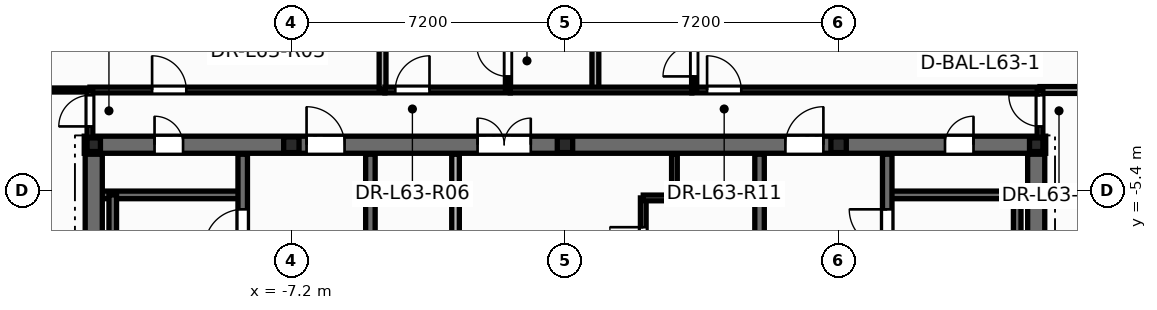
"""IFC4 building model, lengths in metres.
Left out: names, types, materials, properties, quantities, classifications, styles, units other than length and angle.
Written with IfcOpenShell. Run it as: python <this file> out.ifc"""

import sys

from ifc_helpers import new_model, si_unit, direction, frame, frame_2d, origin, origin_2d, place, context, subcontext, project, spatial, rectangle, i_section, extrude, element, fill, save


model = new_model("IFC4")
c1 = context("Model", 3, precision=1e-05, world=origin(), true_north=direction((0.0, 1.0)))
c2 = subcontext(c1, "Body", "Model", "MODEL_VIEW")
j1 = project(units=[si_unit("LENGTHUNIT", "METRE"), si_unit("PLANEANGLEUNIT", "RADIAN")], contexts=[c1])
p1 = place(None, origin())
s1 = spatial("IfcSite", under=j1, at=p1, CompositionType="ELEMENT")
p2 = place(p1, origin())
s2 = spatial("IfcBuilding", under=s1, at=p2, CompositionType="ELEMENT")
p3 = place(p2, frame((0.0, 0.0, 240.6)))
s3 = spatial("IfcBuildingStorey", under=s2, at=p3, CompositionType="ELEMENT", Elevation=240.6)
for number, where, z_axis, x_axis in (
    (1, (12.4, -4.2, 0.0), (0.0, 0.0, 1.0), (1.0, 0.0, 0.0)),
    (2, (-12.4, -4.2, 0.0), (0.0, 0.0, 1.0), (1.0, 0.0, 0.0)),
):
    element("IfcColumn", number, at=place(p3, frame(where, z_axis=z_axis, x_axis=x_axis)), inside=s3, PredefinedType="COLUMN", context=c2, shape_type="SweptSolid", body=[
        extrude(i_section(OverallWidth=0.352, OverallDepth=0.359, WebThickness=0.018, FlangeThickness=0.026, at=origin_2d()), origin(), (0.0, 0.0, 1.0), 3.6),
    ])
for number, where, z_axis, x_axis in (
    (3, (-7.2, -4.2, 0.0), (0.0, 0.0, 1.0), (1.0, 0.0, 0.0)),
    (4, (0.0, -4.2, 0.0), (0.0, 0.0, 1.0), (1.0, 0.0, 0.0)),
    (5, (7.2, -4.2, 0.0), (0.0, 0.0, 1.0), (1.0, 0.0, 0.0)),
):
    element("IfcColumn", number, at=place(p3, frame(where, z_axis=z_axis, x_axis=x_axis)), inside=s3, PredefinedType="PILASTER", context=c2, shape_type="SweptSolid", body=[
        extrude(i_section(OverallWidth=0.405, OverallDepth=0.414, WebThickness=0.022, FlangeThickness=0.032, at=origin_2d()), origin(), (0.0, 0.0, 1.0), 3.6),
    ])
p4 = place(p3, frame((2.06, -7.9, 0.0), z_axis=(0.0, 0.0, 1.0), x_axis=(0.0, 1.0, 0.0)))
e6 = element("IfcWall", 6, at=p4, inside=s3, PredefinedType="PARTITIONING", context=c2, shape_type="SweptSolid", body=[
    extrude(rectangle(XDim=2.3, YDim=0.15, at=frame_2d((1.15, 0.0))), origin(), (0.0, 0.0, 1.0), 3.28),
])
p5 = place(p4, frame((0.65, 0.0, 0.0)))
e7 = element("IfcOpeningElement", 7, at=p5, cuts=e6, PredefinedType="OPENING", context=c2, shape_type="SweptSolid", body=[
    extrude(rectangle(XDim=0.886, YDim=2.104, at=frame_2d((0.44, 1.052))), frame((0.0, 0.085, 0.0), z_axis=(0.0, -1.0, 0.0), x_axis=(1.0, 0.0, 0.0)), (0.0, 0.0, 1.0), 0.17),
])
p6 = place(p3, frame((2.06, -5.6, 0.0), z_axis=(0.0, 0.0, 1.0), x_axis=(1.0, 0.0, 0.0)))
e8 = element("IfcWall", 8, at=p6, inside=s3, PredefinedType="PARTITIONING", context=c2, shape_type="SweptSolid", body=[
    extrude(rectangle(XDim=0.82, YDim=0.15, at=frame_2d((0.41, 0.0))), origin(), (0.0, 0.0, 1.0), 3.28),
])
p7 = place(p3, frame((2.88, -5.6, 0.0), z_axis=(0.0, 0.0, 1.0), x_axis=(0.0, 1.0, 0.0)))
e9 = element("IfcWall", 9, at=p7, inside=s3, PredefinedType="PARTITIONING", context=c2, shape_type="SweptSolid", body=[
    extrude(rectangle(XDim=1.15, YDim=0.15, at=frame_2d((0.575, 0.0))), origin(), (0.0, 0.0, 1.0), 3.28),
])
p8 = place(p3, frame((-12.65, -4.2, 0.0), z_axis=(0.0, 0.0, 1.0), x_axis=(1.0, 0.0, 0.0)))
e10 = element("IfcWall", 10, at=p8, inside=s3, PredefinedType="SHEAR", context=c2, shape_type="SweptSolid", body=[
    extrude(rectangle(XDim=25.3, YDim=0.45, at=frame_2d((12.65, 0.0))), origin(), (0.0, 0.0, 1.0), 3.6),
])
p9 = place(p8, frame((1.85, 0.0, 0.0)))
e11 = element("IfcOpeningElement", 11, at=p9, cuts=e10, PredefinedType="OPENING", context=c2, shape_type="SweptSolid", body=[
    extrude(rectangle(XDim=0.756, YDim=2.054, at=frame_2d((0.375, 1.027))), frame((0.0, 0.235, 0.0), z_axis=(0.0, -1.0, 0.0), x_axis=(1.0, 0.0, 0.0)), (0.0, 0.0, 1.0), 0.47),
])
p10 = place(p8, frame((22.65, 0.0, 0.0)))
e12 = element("IfcOpeningElement", 12, at=p10, cuts=e10, PredefinedType="OPENING", context=c2, shape_type="SweptSolid", body=[
    extrude(rectangle(XDim=0.756, YDim=2.054, at=frame_2d((0.375, 1.027))), frame((0.0, 0.235, 0.0), z_axis=(0.0, -1.0, 0.0), x_axis=(1.0, 0.0, 0.0)), (0.0, 0.0, 1.0), 0.47),
])
p11 = place(p8, frame((5.85, 0.0, 0.0)))
e13 = element("IfcOpeningElement", 13, at=p11, cuts=e10, PredefinedType="OPENING", context=c2, shape_type="SweptSolid", body=[
    extrude(rectangle(XDim=1.006, YDim=2.104, at=frame_2d((0.5, 1.052))), frame((0.0, 0.235, 0.0), z_axis=(0.0, -1.0, 0.0), x_axis=(1.0, 0.0, 0.0)), (0.0, 0.0, 1.0), 0.47),
])
p12 = place(p8, frame((10.35, 0.0, 0.0)))
e14 = element("IfcOpeningElement", 14, at=p12, cuts=e10, PredefinedType="OPENING", context=c2, shape_type="SweptSolid", body=[
    extrude(rectangle(XDim=1.406, YDim=2.154, at=frame_2d((0.7, 1.077))), frame((0.0, 0.235, 0.0), z_axis=(0.0, -1.0, 0.0), x_axis=(1.0, 0.0, 0.0)), (0.0, 0.0, 1.0), 0.47),
])
p13 = place(p8, frame((18.45, 0.0, 0.0)))
e15 = element("IfcOpeningElement", 15, at=p13, cuts=e10, PredefinedType="OPENING", context=c2, shape_type="SweptSolid", body=[
    extrude(rectangle(XDim=1.006, YDim=2.104, at=frame_2d((0.5, 1.052))), frame((0.0, 0.235, 0.0), z_axis=(0.0, -1.0, 0.0), x_axis=(1.0, 0.0, 0.0)), (0.0, 0.0, 1.0), 0.47),
])
p14 = place(p3, frame((-12.35, -5.52, 0.0), z_axis=(0.0, 0.0, 1.0), x_axis=(1.0, 0.0, 0.0)))
e16 = element("IfcWall", 16, at=p14, inside=s3, PredefinedType="SOLIDWALL", context=c2, shape_type="SweptSolid", body=[
    extrude(rectangle(XDim=3.87, YDim=0.2, at=frame_2d((1.935, 0.0))), origin(), (0.0, 0.0, 1.0), 3.6),
])
p15 = place(p3, frame((-11.9, -13.1, 0.0), z_axis=(0.0, 0.0, 1.0), x_axis=(0.0, 1.0, 0.0)))
e17 = element("IfcWall", 17, at=p15, inside=s3, PredefinedType="SOLIDWALL", context=c2, shape_type="SweptSolid", body=[
    extrude(rectangle(XDim=7.58, YDim=0.2, at=frame_2d((3.79, 0.0))), origin(), (0.0, 0.0, 1.0), 3.6),
])
p16 = place(p3, frame((8.48, -5.52, 0.0), z_axis=(0.0, 0.0, 1.0), x_axis=(1.0, 0.0, 0.0)))
e18 = element("IfcWall", 18, at=p16, inside=s3, PredefinedType="SOLIDWALL", context=c2, shape_type="SweptSolid", body=[
    extrude(rectangle(XDim=3.87, YDim=0.2, at=frame_2d((1.935, 0.0))), origin(), (0.0, 0.0, 1.0), 3.6),
])
p17 = place(p3, frame((11.9, -13.1, 0.0), z_axis=(0.0, 0.0, 1.0), x_axis=(0.0, 1.0, 0.0)))
e19 = element("IfcWall", 19, at=p17, inside=s3, PredefinedType="SOLIDWALL", context=c2, shape_type="SweptSolid", body=[
    extrude(rectangle(XDim=7.58, YDim=0.2, at=frame_2d((3.79, 0.0))), origin(), (0.0, 0.0, 1.0), 3.6),
])
p18 = place(p3, frame((-8.48, -13.85, 0.0), z_axis=(0.0, 0.0, 1.0), x_axis=(0.0, 1.0, 0.0)))
e20 = element("IfcWall", 20, at=p18, inside=s3, PredefinedType="SHEAR", context=c2, shape_type="SweptSolid", body=[
    extrude(rectangle(XDim=9.4, YDim=0.25, at=frame_2d((4.7, 0.0))), origin(), (0.0, 0.0, 1.0), 3.6),
])
p19 = place(p18, frame((6.95, 0.0, 0.0)))
e21 = element("IfcOpeningElement", 21, at=p19, cuts=e20, PredefinedType="OPENING", context=c2, shape_type="SweptSolid", body=[
    extrude(rectangle(XDim=1.006, YDim=2.104, at=frame_2d((0.5, 1.052))), frame((0.0, 0.135, 0.0), z_axis=(0.0, -1.0, 0.0), x_axis=(1.0, 0.0, 0.0)), (0.0, 0.0, 1.0), 0.27),
])
p20 = place(p3, frame((8.48, -13.85, 0.0), z_axis=(0.0, 0.0, 1.0), x_axis=(0.0, 1.0, 0.0)))
e22 = element("IfcWall", 22, at=p20, inside=s3, PredefinedType="SHEAR", context=c2, shape_type="SweptSolid", body=[
    extrude(rectangle(XDim=9.4, YDim=0.25, at=frame_2d((4.7, 0.0))), origin(), (0.0, 0.0, 1.0), 3.6),
])
p21 = place(p20, frame((6.95, 0.0, 0.0)))
e23 = element("IfcOpeningElement", 23, at=p21, cuts=e22, PredefinedType="OPENING", context=c2, shape_type="SweptSolid", body=[
    extrude(rectangle(XDim=1.006, YDim=2.104, at=frame_2d((0.5, 1.052))), frame((0.0, 0.135, 0.0), z_axis=(0.0, -1.0, 0.0), x_axis=(1.0, 0.0, 0.0)), (0.0, 0.0, 1.0), 0.27),
])
for number, where, z_axis, x_axis in (
    (24, (-5.12, -13.85, 0.0), (0.0, 0.0, 1.0), (0.0, 1.0, 0.0)),
    (25, (5.12, -13.85, 0.0), (0.0, 0.0, 1.0), (0.0, 1.0, 0.0)),
):
    element("IfcWall", number, at=place(p3, frame(where, z_axis=z_axis, x_axis=x_axis)), inside=s3, PredefinedType="SHEAR", context=c2, shape_type="SweptSolid", body=[
        extrude(rectangle(XDim=9.4, YDim=0.25, at=frame_2d((4.7, 0.0))), origin(), (0.0, 0.0, 1.0), 3.6),
    ])
for number, where, z_axis, x_axis in (
    (26, (-12.4, -13.85, 0.0), (0.0, 0.0, 1.0), (0.0, 1.0, 0.0)),
    (27, (12.4, -13.85, 0.0), (0.0, 0.0, 1.0), (0.0, 1.0, 0.0)),
):
    element("IfcWall", number, at=place(p3, frame(where, z_axis=z_axis, x_axis=x_axis)), inside=s3, PredefinedType="SHEAR", context=c2, shape_type="SweptSolid", body=[
        extrude(rectangle(XDim=9.4, YDim=0.45, at=frame_2d((4.7, 0.0))), origin(), (0.0, 0.0, 1.0), 3.6),
    ])
p22 = place(p3, frame((-2.88, -9.45, 0.0), z_axis=(0.0, 0.0, 1.0), x_axis=(0.0, 1.0, 0.0)))
e28 = element("IfcWall", 28, at=p22, inside=s3, PredefinedType="SOLIDWALL", context=c2, shape_type="SweptSolid", body=[
    extrude(rectangle(XDim=5.0, YDim=0.2, at=frame_2d((2.5, 0.0))), origin(), (0.0, 0.0, 1.0), 3.28),
])
p23 = place(p22, frame((2.05, 0.0, 0.0)))
e29 = element("IfcOpeningElement", 29, at=p23, cuts=e28, PredefinedType="OPENING", context=c2, shape_type="SweptSolid", body=[
    extrude(rectangle(XDim=0.926, YDim=2.104, at=frame_2d((0.46, 1.052))), frame((0.0, 0.11, 0.0), z_axis=(0.0, -1.0, 0.0), x_axis=(1.0, 0.0, 0.0)), (0.0, 0.0, 1.0), 0.22),
])
p24 = place(p3, frame((3.34, -2.76, 0.0), z_axis=(0.0, 0.0, 1.0), x_axis=(1.0, 0.0, 0.0)))
e30 = element("IfcWall", 30, at=p24, inside=s3, PredefinedType="PARTITIONING", context=c2, shape_type="SweptSolid", body=[
    extrude(rectangle(XDim=9.16, YDim=0.15, at=frame_2d((4.58, 0.0))), origin(), (0.0, 0.0, 1.0), 2.255),
])
p25 = place(p24, frame((0.399, 0.0, 0.0)))
e31 = element("IfcOpeningElement", 31, at=p25, cuts=e30, PredefinedType="OPENING", context=c2, shape_type="SweptSolid", body=[
    extrude(rectangle(XDim=0.906, YDim=2.104, at=frame_2d((0.45, 1.052))), frame((0.0, 0.085, 0.0), z_axis=(0.0, -1.0, 0.0), x_axis=(1.0, 0.0, 0.0)), (0.0, 0.0, 1.0), 0.17),
])
p26 = place(p3, frame((-12.5, -2.76, 0.0), z_axis=(0.0, 0.0, 1.0), x_axis=(1.0, 0.0, 0.0)))
e32 = element("IfcWall", 32, at=p26, inside=s3, PredefinedType="PARTITIONING", context=c2, shape_type="SweptSolid", body=[
    extrude(rectangle(XDim=7.76, YDim=0.15, at=frame_2d((3.88, 0.0))), origin(), (0.0, 0.0, 1.0), 2.255),
])
p27 = place(p26, frame((1.635, 0.0, 0.0)))
e33 = element("IfcOpeningElement", 33, at=p27, cuts=e32, PredefinedType="OPENING", context=c2, shape_type="SweptSolid", body=[
    extrude(rectangle(XDim=0.906, YDim=2.104, at=frame_2d((0.45, 1.052))), frame((0.0, 0.085, 0.0), z_axis=(0.0, -1.0, 0.0), x_axis=(1.0, 0.0, 0.0)), (0.0, 0.0, 1.0), 0.17),
])
p28 = place(p3, frame((-4.8, -2.74, 0.0), z_axis=(0.0, 0.0, 1.0), x_axis=(0.0, 1.0, 0.0)))
e34 = element("IfcWall", 34, at=p28, inside=s3, PredefinedType="PARTITIONING", context=c2, shape_type="SweptSolid", body=[
    extrude(rectangle(XDim=13.633, YDim=0.18, at=frame_2d((6.817, 0.0))), origin(), (0.0, 0.0, 1.0), 2.255),
])
p29 = place(p3, frame((0.8, -2.76, 0.0), z_axis=(0.0, 0.0, 1.0), x_axis=(0.0, 1.0, 0.0)))
e35 = element("IfcWall", 35, at=p29, inside=s3, PredefinedType="PARTITIONING", context=c2, shape_type="SweptSolid", body=[
    extrude(rectangle(XDim=16.509, YDim=0.18, at=frame_2d((8.254, 0.0))), origin(), (0.0, 0.0, 1.0), 2.255),
])
p30 = place(p3, frame((-4.738, -2.76, 0.0), z_axis=(0.0, 0.0, 1.0), x_axis=(1.0, 0.0, 0.0)))
e36 = element("IfcWall", 36, at=p30, inside=s3, PredefinedType="PARTITIONING", context=c2, shape_type="SweptSolid", body=[
    extrude(rectangle(XDim=3.298, YDim=0.15, at=frame_2d((1.649, 0.0))), origin(), (0.0, 0.0, 1.0), 2.899),
])
p31 = place(p30, frame((0.273, 0.0, 0.0)))
e37 = element("IfcOpeningElement", 37, at=p31, cuts=e36, PredefinedType="OPENING", context=c2, shape_type="SweptSolid", body=[
    extrude(rectangle(XDim=0.906, YDim=2.104, at=frame_2d((0.45, 1.052))), frame((0.0, 0.085, 0.0), z_axis=(0.0, -1.0, 0.0), x_axis=(1.0, 0.0, 0.0)), (0.0, 0.0, 1.0), 0.17),
])
p32 = place(p3, frame((-1.5, -2.76, 0.0), z_axis=(0.0, 0.0, 1.0), x_axis=(0.0, 1.0, 0.0)))
e38 = element("IfcWall", 38, at=p32, inside=s3, PredefinedType="PARTITIONING", context=c2, shape_type="SweptSolid", body=[
    extrude(rectangle(XDim=2.92, YDim=0.135, at=frame_2d((1.46, 0.0))), origin(), (0.0, 0.0, 1.0), 3.28),
])
p33 = place(p32, frame((0.357, 0.0, 0.0)))
e39 = element("IfcOpeningElement", 39, at=p33, cuts=e38, PredefinedType="OPENING", context=c2, shape_type="SweptSolid", body=[
    extrude(rectangle(XDim=0.826, YDim=2.104, at=frame_2d((0.41, 1.052))), frame((0.0, 0.078, 0.0), z_axis=(0.0, -1.0, 0.0), x_axis=(1.0, 0.0, 0.0)), (0.0, 0.0, 1.0), 0.155),
])
p34 = place(p3, frame((3.4, -2.76, 0.0), z_axis=(0.0, 0.0, 1.0), x_axis=(0.0, 1.0, 0.0)))
e40 = element("IfcWall", 40, at=p34, inside=s3, PredefinedType="PARTITIONING", context=c2, shape_type="SweptSolid", body=[
    extrude(rectangle(XDim=2.92, YDim=0.135, at=frame_2d((1.46, 0.0))), origin(), (0.0, 0.0, 1.0), 3.28),
])
p35 = place(p34, frame((0.357, 0.0, 0.0)))
e41 = element("IfcOpeningElement", 41, at=p35, cuts=e40, PredefinedType="OPENING", context=c2, shape_type="SweptSolid", body=[
    extrude(rectangle(XDim=0.826, YDim=2.104, at=frame_2d((0.41, 1.052))), frame((0.0, 0.078, 0.0), z_axis=(0.0, -1.0, 0.0), x_axis=(1.0, 0.0, 0.0)), (0.0, 0.0, 1.0), 0.155),
])
p36 = place(p3, frame((-1.438, -2.76, 0.0), z_axis=(0.0, 0.0, 1.0), x_axis=(1.0, 0.0, 0.0)))
e42 = element("IfcWall", 42, at=p36, inside=s3, PredefinedType="PARTITIONING", context=c2, shape_type="SweptSolid", body=[
    extrude(rectangle(XDim=4.776, YDim=0.15, at=frame_2d((2.388, 0.0))), origin(), (0.0, 0.0, 1.0), 2.255),
])
p37 = place(p3, frame((-14.588, -2.76, 0.0), z_axis=(0.0, 0.0, 1.0), x_axis=(1.0, 0.0, 0.0)))
e43 = element("IfcWall", 43, at=p37, inside=s3, PredefinedType="PARTITIONING", context=c2, shape_type="SweptSolid", body=[
    extrude(rectangle(XDim=2.088, YDim=0.105, at=frame_2d((1.044, 0.0))), origin(), (0.0, 0.0, 1.0), 2.653),
])
p38 = place(p3, frame((12.5, -2.76, 0.0), z_axis=(0.0, 0.0, 1.0), x_axis=(1.0, 0.0, 0.0)))
e44 = element("IfcWall", 44, at=p38, inside=s3, PredefinedType="PARTITIONING", context=c2, shape_type="SweptSolid", body=[
    extrude(rectangle(XDim=2.088, YDim=0.18, at=frame_2d((1.044, 0.0))), origin(), (0.0, 0.0, 1.0), 2.653),
])
p39 = place(p3, frame((-12.5, -4.24, 0.0), z_axis=(0.0, 0.0, 1.0), x_axis=(0.0, 1.0, 0.0)))
e45 = element("IfcWall", 45, at=p39, inside=s3, PredefinedType="PARTITIONING", context=c2, shape_type="SweptSolid", body=[
    extrude(rectangle(XDim=1.48, YDim=0.15, at=frame_2d((0.74, 0.0))), origin(), (0.0, 0.0, 1.0), 2.255),
])
p40 = place(p39, frame((0.522, 0.0, 0.0)))
e46 = element("IfcOpeningElement", 46, at=p40, cuts=e45, PredefinedType="OPENING", context=c2, shape_type="SweptSolid", body=[
    extrude(rectangle(XDim=0.826, YDim=2.104, at=frame_2d((0.41, 1.052))), frame((0.0, 0.085, 0.0), z_axis=(0.0, -1.0, 0.0), x_axis=(1.0, 0.0, 0.0)), (0.0, 0.0, 1.0), 0.17),
])
p41 = place(p3, frame((12.5, -4.24, 0.0), z_axis=(0.0, 0.0, 1.0), x_axis=(0.0, 1.0, 0.0)))
e47 = element("IfcWall", 47, at=p41, inside=s3, PredefinedType="PARTITIONING", context=c2, shape_type="SweptSolid", body=[
    extrude(rectangle(XDim=1.48, YDim=0.15, at=frame_2d((0.74, 0.0))), origin(), (0.0, 0.0, 1.0), 2.255),
])
p42 = place(p41, frame((0.522, 0.0, 0.0)))
e48 = element("IfcOpeningElement", 48, at=p42, cuts=e47, PredefinedType="OPENING", context=c2, shape_type="SweptSolid", body=[
    extrude(rectangle(XDim=0.826, YDim=2.104, at=frame_2d((0.41, 1.052))), frame((0.0, 0.085, 0.0), z_axis=(0.0, -1.0, 0.0), x_axis=(1.0, 0.0, 0.0)), (0.0, 0.0, 1.0), 0.17),
])
p43 = place(p5, origin())
e49 = element("IfcDoor", 49, at=p43, inside=s3, OperationType="SINGLE_SWING_RIGHT", PredefinedType="DOOR", context=c2, shape_type="SweptSolid", body=[
    extrude(rectangle(XDim=0.88, YDim=2.1, at=frame_2d((0.44, 1.05))), frame((0.0, 0.025, 0.0), z_axis=(0.0, -1.0, 0.0), x_axis=(1.0, 0.0, 0.0)), (0.0, 0.0, 1.0), 0.05),
])
fill(e7, e49)
p44 = place(p19, origin())
e50 = element("IfcDoor", 50, at=p44, inside=s3, OperationType="SINGLE_SWING_LEFT", PredefinedType="DOOR", context=c2, shape_type="SweptSolid", body=[
    extrude(rectangle(XDim=1.0, YDim=2.1, at=frame_2d((0.5, 1.05))), frame((0.0, 0.025, 0.0), z_axis=(0.0, -1.0, 0.0), x_axis=(1.0, 0.0, 0.0)), (0.0, 0.0, 1.0), 0.05),
])
fill(e21, e50)
p45 = place(p21, origin())
e51 = element("IfcDoor", 51, at=p45, inside=s3, OperationType="SINGLE_SWING_RIGHT", PredefinedType="DOOR", context=c2, shape_type="SweptSolid", body=[
    extrude(rectangle(XDim=1.0, YDim=2.1, at=frame_2d((0.5, 1.05))), frame((0.0, 0.025, 0.0), z_axis=(0.0, -1.0, 0.0), x_axis=(1.0, 0.0, 0.0)), (0.0, 0.0, 1.0), 0.05),
])
fill(e23, e51)
p46 = place(p9, origin())
e52 = element("IfcDoor", 52, at=p46, inside=s3, OperationType="SINGLE_SWING_LEFT", PredefinedType="DOOR", context=c2, shape_type="SweptSolid", body=[
    extrude(rectangle(XDim=0.75, YDim=2.05, at=frame_2d((0.375, 1.025))), frame((0.0, 0.025, 0.0), z_axis=(0.0, -1.0, 0.0), x_axis=(1.0, 0.0, 0.0)), (0.0, 0.0, 1.0), 0.05),
])
fill(e11, e52)
p47 = place(p10, origin())
e53 = element("IfcDoor", 53, at=p47, inside=s3, OperationType="SINGLE_SWING_RIGHT", PredefinedType="DOOR", context=c2, shape_type="SweptSolid", body=[
    extrude(rectangle(XDim=0.75, YDim=2.05, at=frame_2d((0.375, 1.025))), frame((0.0, 0.025, 0.0), z_axis=(0.0, -1.0, 0.0), x_axis=(1.0, 0.0, 0.0)), (0.0, 0.0, 1.0), 0.05),
])
fill(e12, e53)
p48 = place(p11, origin())
e54 = element("IfcDoor", 54, at=p48, inside=s3, OperationType="SINGLE_SWING_LEFT", PredefinedType="DOOR", context=c2, shape_type="SweptSolid", body=[
    extrude(rectangle(XDim=1.0, YDim=2.1, at=frame_2d((0.5, 1.05))), frame((0.0, 0.025, 0.0), z_axis=(0.0, -1.0, 0.0), x_axis=(1.0, 0.0, 0.0)), (0.0, 0.0, 1.0), 0.05),
])
fill(e13, e54)
p49 = place(p12, origin())
e55 = element("IfcDoor", 55, at=p49, inside=s3, OperationType="DOUBLE_DOOR_SINGLE_SWING", PredefinedType="DOOR", context=c2, shape_type="SweptSolid", body=[
    extrude(rectangle(XDim=1.4, YDim=2.15, at=frame_2d((0.7, 1.075))), frame((0.0, 0.025, 0.0), z_axis=(0.0, -1.0, 0.0), x_axis=(1.0, 0.0, 0.0)), (0.0, 0.0, 1.0), 0.05),
])
fill(e14, e55)
p50 = place(p13, origin())
e56 = element("IfcDoor", 56, at=p50, inside=s3, OperationType="SINGLE_SWING_RIGHT", PredefinedType="DOOR", context=c2, shape_type="SweptSolid", body=[
    extrude(rectangle(XDim=1.0, YDim=2.1, at=frame_2d((0.5, 1.05))), frame((0.0, 0.025, 0.0), z_axis=(0.0, -1.0, 0.0), x_axis=(1.0, 0.0, 0.0)), (0.0, 0.0, 1.0), 0.05),
])
fill(e15, e56)
p51 = place(p40, origin())
e57 = element("IfcDoor", 57, at=p51, inside=s3, OperationType="SINGLE_SWING_LEFT", PredefinedType="DOOR", context=c2, shape_type="SweptSolid", body=[
    extrude(rectangle(XDim=0.82, YDim=2.1, at=frame_2d((0.41, 1.05))), frame((0.0, 0.025, 0.0), z_axis=(0.0, -1.0, 0.0), x_axis=(1.0, 0.0, 0.0)), (0.0, 0.0, 1.0), 0.05),
])
fill(e46, e57)
p52 = place(p42, origin())
e58 = element("IfcDoor", 58, at=p52, inside=s3, OperationType="SINGLE_SWING_RIGHT", PredefinedType="DOOR", context=c2, shape_type="SweptSolid", body=[
    extrude(rectangle(XDim=0.82, YDim=2.1, at=frame_2d((0.41, 1.05))), frame((0.0, 0.025, 0.0), z_axis=(0.0, -1.0, 0.0), x_axis=(1.0, 0.0, 0.0)), (0.0, 0.0, 1.0), 0.05),
])
fill(e48, e58)
p53 = place(p27, origin())
e59 = element("IfcDoor", 59, at=p53, inside=s3, OperationType="SINGLE_SWING_LEFT", PredefinedType="DOOR", context=c2, shape_type="SweptSolid", body=[
    extrude(rectangle(XDim=0.9, YDim=2.1, at=frame_2d((0.45, 1.05))), frame((0.0, 0.025, 0.0), z_axis=(0.0, -1.0, 0.0), x_axis=(1.0, 0.0, 0.0)), (0.0, 0.0, 1.0), 0.05),
])
fill(e33, e59)
p54 = place(p33, origin())
e60 = element("IfcDoor", 60, at=p54, inside=s3, OperationType="SINGLE_SWING_RIGHT", PredefinedType="DOOR", context=c2, shape_type="SweptSolid", body=[
    extrude(rectangle(XDim=0.82, YDim=2.1, at=frame_2d((0.41, 1.05))), frame((0.0, 0.025, 0.0), z_axis=(0.0, -1.0, 0.0), x_axis=(1.0, 0.0, 0.0)), (0.0, 0.0, 1.0), 0.05),
])
fill(e39, e60)
p55 = place(p31, origin())
e61 = element("IfcDoor", 61, at=p55, inside=s3, OperationType="SINGLE_SWING_RIGHT", PredefinedType="DOOR", context=c2, shape_type="SweptSolid", body=[
    extrude(rectangle(XDim=0.9, YDim=2.1, at=frame_2d((0.45, 1.05))), frame((0.0, 0.025, 0.0), z_axis=(0.0, -1.0, 0.0), x_axis=(1.0, 0.0, 0.0)), (0.0, 0.0, 1.0), 0.05),
])
fill(e37, e61)
p56 = place(p35, origin())
e62 = element("IfcDoor", 62, at=p56, inside=s3, OperationType="SINGLE_SWING_LEFT", PredefinedType="DOOR", context=c2, shape_type="SweptSolid", body=[
    extrude(rectangle(XDim=0.82, YDim=2.1, at=frame_2d((0.41, 1.05))), frame((0.0, 0.025, 0.0), z_axis=(0.0, -1.0, 0.0), x_axis=(1.0, 0.0, 0.0)), (0.0, 0.0, 1.0), 0.05),
])
fill(e41, e62)
p57 = place(p25, origin())
e63 = element("IfcDoor", 63, at=p57, inside=s3, OperationType="SINGLE_SWING_LEFT", PredefinedType="DOOR", context=c2, shape_type="SweptSolid", body=[
    extrude(rectangle(XDim=0.9, YDim=2.1, at=frame_2d((0.45, 1.05))), frame((0.0, 0.025, 0.0), z_axis=(0.0, -1.0, 0.0), x_axis=(1.0, 0.0, 0.0)), (0.0, 0.0, 1.0), 0.05),
])
fill(e31, e63)
save(model, sys.argv[1])
